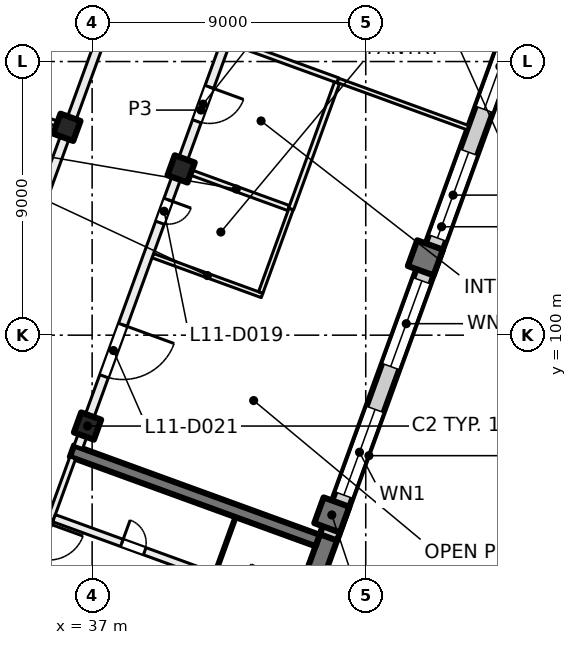
"""IFC4 building model, lengths in metres.
Left out: names, types, materials, properties, quantities, classifications, styles, units other than length and angle.
Written with IfcOpenShell. Run it as: python <this file> out.ifc"""

import sys

from ifc_helpers import new_model, si_unit, direction, frame, frame_2d, origin, origin_2d, place, context, subcontext, project, spatial, rectangle, extrude, element, fill, save


model = new_model("IFC4")
c1 = context("Model", 3, precision=1e-05, world=origin(), true_north=direction((0.0, 1.0)))
c2 = subcontext(c1, "Body", "Model", "MODEL_VIEW")
j1 = project(units=[si_unit("LENGTHUNIT", "METRE"), si_unit("PLANEANGLEUNIT", "RADIAN")], contexts=[c1])
p1 = place(None, origin())
s1 = spatial("IfcSite", under=j1, at=p1, CompositionType="ELEMENT")
p2 = place(p1, origin())
s2 = spatial("IfcBuilding", under=s1, at=p2, CompositionType="ELEMENT")
p3 = place(p2, frame((0.0, 0.0, 51.5)))
s3 = spatial("IfcBuildingStorey", under=s2, at=p3, CompositionType="ELEMENT", Elevation=51.5)
for number, where, z_axis, x_axis in (
    (1, (39.927, 105.468, 0.0), (0.0, 0.0, 1.0), (-0.342, -0.94, 0.0)),
    (2, (36.849, 97.011, 0.0), (0.0, 0.0, 1.0), (-0.342, -0.94, 0.0)),
    (3, (36.169, 106.836, 0.0), (0.0, 0.0, 1.0), (-0.342, -0.94, 0.0)),
):
    element("IfcColumn", number, at=place(p3, frame(where, z_axis=z_axis, x_axis=x_axis)), inside=s3, PredefinedType="COLUMN", context=c2, shape_type="SweptSolid", body=[
        extrude(rectangle(XDim=0.7, YDim=0.7, at=origin_2d()), origin(), (0.0, 0.0, 1.0), 4.0),
    ])
for number, where, z_axis, x_axis in (
    (4, (47.962, 102.544, 0.0), (0.0, 0.0, 1.0), (-0.342, -0.94, 0.0)),
    (5, (44.884, 94.087, 0.0), (0.0, 0.0, 1.0), (-0.342, -0.94, 0.0)),
):
    element("IfcColumn", number, at=place(p3, frame(where, z_axis=z_axis, x_axis=x_axis)), inside=s3, PredefinedType="COLUMN", context=c2, shape_type="SweptSolid", body=[
        extrude(rectangle(XDim=0.9, YDim=0.9, at=origin_2d()), origin(), (0.0, 0.0, 1.0), 4.0),
    ])
p4 = place(p3, frame((41.827, 85.249, 0.0), z_axis=(0.0, 0.0, 1.0), x_axis=(0.342016162452, 0.939694069696, 0.0)))
e6 = element("IfcWall", 6, at=p4, inside=s3, PredefinedType="SHEAR", context=c2, shape_type="SweptSolid", body=[
    extrude(rectangle(XDim=8.9, YDim=0.6, at=frame_2d((4.45, 0.0))), origin(), (0.0, 0.0, 1.0), 4.0),
])
p5 = place(p3, frame((44.418, 93.245, 0.0), z_axis=(0.0, 0.0, 1.0), x_axis=(-0.93969060187, 0.342025690201, 0.0)))
e7 = element("IfcWall", 7, at=p5, inside=s3, PredefinedType="SHEAR", context=c2, shape_type="SweptSolid", body=[
    extrude(rectangle(XDim=8.6, YDim=0.4, at=frame_2d((4.3, 0.0))), origin(), (0.0, 0.0, 1.0), 4.0),
])
p6 = place(p3, frame((52.212, 113.783, 0.0), z_axis=(0.0, 0.0, 1.0), x_axis=(-0.34202521188, -0.939690775968, 0.0)))
e8 = element("IfcWall", 8, at=p6, inside=s3, PredefinedType="SOLIDWALL", context=c2, shape_type="SweptSolid", body=[
    extrude(rectangle(XDim=21.745, YDim=0.6, at=frame_2d((10.873, 0.0))), origin(), (0.0, 0.0, 1.0), 3.625),
])
p7 = place(p6, frame((3.765, 0.0, 0.9)))
e9 = element("IfcOpeningElement", 9, at=p7, cuts=e8, PredefinedType="OPENING", context=c2, shape_type="SweptSolid", body=[
    extrude(rectangle(XDim=3.0, YDim=2.4, at=frame_2d((1.5, 1.2))), frame((0.0, 0.31, 0.0), z_axis=(0.0, -1.0, 0.0), x_axis=(1.0, 0.0, 0.0)), (0.0, 0.0, 1.0), 0.62),
])
p8 = place(p6, frame((8.265, 0.0, 0.9)))
e10 = element("IfcOpeningElement", 10, at=p8, cuts=e8, PredefinedType="OPENING", context=c2, shape_type="SweptSolid", body=[
    extrude(rectangle(XDim=3.0, YDim=2.4, at=frame_2d((1.5, 1.2))), frame((0.0, 0.31, 0.0), z_axis=(0.0, -1.0, 0.0), x_axis=(1.0, 0.0, 0.0)), (0.0, 0.0, 1.0), 0.62),
])
p9 = place(p6, frame((12.765, 0.0, 0.9)))
e11 = element("IfcOpeningElement", 11, at=p9, cuts=e8, PredefinedType="OPENING", context=c2, shape_type="SweptSolid", body=[
    extrude(rectangle(XDim=3.0, YDim=2.4, at=frame_2d((1.5, 1.2))), frame((0.0, 0.31, 0.0), z_axis=(0.0, -1.0, 0.0), x_axis=(1.0, 0.0, 0.0)), (0.0, 0.0, 1.0), 0.62),
])
p10 = place(p6, frame((17.265, 0.0, 0.9)))
e12 = element("IfcOpeningElement", 12, at=p10, cuts=e8, PredefinedType="OPENING", context=c2, shape_type="SweptSolid", body=[
    extrude(rectangle(XDim=3.0, YDim=2.4, at=frame_2d((1.5, 1.2))), frame((0.0, 0.31, 0.0), z_axis=(0.0, -1.0, 0.0), x_axis=(1.0, 0.0, 0.0)), (0.0, 0.0, 1.0), 0.62),
])
p11 = place(p3, frame((24.666, 100.669, 0.0), z_axis=(0.0, 0.0, 1.0), x_axis=(0.34201964167, 0.939692803373, 0.0)))
e13 = element("IfcWall", 13, at=p11, inside=s3, PredefinedType="SOLIDWALL", context=c2, shape_type="SweptSolid", body=[
    extrude(rectangle(XDim=32.884, YDim=0.6, at=frame_2d((16.442, 0.0))), origin(), (0.0, 0.0, 1.0), 3.625),
])
p12 = place(p11, frame((1.48, 0.0, 0.9)))
e14 = element("IfcOpeningElement", 14, at=p12, cuts=e13, PredefinedType="OPENING", context=c2, shape_type="SweptSolid", body=[
    extrude(rectangle(XDim=3.0, YDim=2.4, at=frame_2d((1.5, 1.2))), frame((0.0, 0.31, 0.0), z_axis=(0.0, -1.0, 0.0), x_axis=(1.0, 0.0, 0.0)), (0.0, 0.0, 1.0), 0.62),
])
p13 = place(p11, frame((5.98, 0.0, 0.9)))
e15 = element("IfcOpeningElement", 15, at=p13, cuts=e13, PredefinedType="OPENING", context=c2, shape_type="SweptSolid", body=[
    extrude(rectangle(XDim=3.0, YDim=2.4, at=frame_2d((1.5, 1.2))), frame((0.0, 0.31, 0.0), z_axis=(0.0, -1.0, 0.0), x_axis=(1.0, 0.0, 0.0)), (0.0, 0.0, 1.0), 0.62),
])
p14 = place(p11, frame((10.48, 0.0, 0.9)))
e16 = element("IfcOpeningElement", 16, at=p14, cuts=e13, PredefinedType="OPENING", context=c2, shape_type="SweptSolid", body=[
    extrude(rectangle(XDim=3.0, YDim=2.4, at=frame_2d((1.5, 1.2))), frame((0.0, 0.31, 0.0), z_axis=(0.0, -1.0, 0.0), x_axis=(1.0, 0.0, 0.0)), (0.0, 0.0, 1.0), 0.62),
])
p15 = place(p11, frame((14.98, 0.0, 0.9)))
e17 = element("IfcOpeningElement", 17, at=p15, cuts=e13, PredefinedType="OPENING", context=c2, shape_type="SweptSolid", body=[
    extrude(rectangle(XDim=3.0, YDim=2.4, at=frame_2d((1.5, 1.2))), frame((0.0, 0.31, 0.0), z_axis=(0.0, -1.0, 0.0), x_axis=(1.0, 0.0, 0.0)), (0.0, 0.0, 1.0), 0.62),
])
p16 = place(p11, frame((19.48, 0.0, 0.9)))
e18 = element("IfcOpeningElement", 18, at=p16, cuts=e13, PredefinedType="OPENING", context=c2, shape_type="SweptSolid", body=[
    extrude(rectangle(XDim=3.0, YDim=2.4, at=frame_2d((1.5, 1.2))), frame((0.0, 0.31, 0.0), z_axis=(0.0, -1.0, 0.0), x_axis=(1.0, 0.0, 0.0)), (0.0, 0.0, 1.0), 0.62),
])
p17 = place(p11, frame((23.98, 0.0, 0.9)))
e19 = element("IfcOpeningElement", 19, at=p17, cuts=e13, PredefinedType="OPENING", context=c2, shape_type="SweptSolid", body=[
    extrude(rectangle(XDim=3.0, YDim=2.4, at=frame_2d((1.5, 1.2))), frame((0.0, 0.31, 0.0), z_axis=(0.0, -1.0, 0.0), x_axis=(1.0, 0.0, 0.0)), (0.0, 0.0, 1.0), 0.62),
])
p18 = place(p11, frame((28.48, 0.0, 0.9)))
e20 = element("IfcOpeningElement", 20, at=p18, cuts=e13, PredefinedType="OPENING", context=c2, shape_type="SweptSolid", body=[
    extrude(rectangle(XDim=3.0, YDim=2.4, at=frame_2d((1.5, 1.2))), frame((0.0, 0.31, 0.0), z_axis=(0.0, -1.0, 0.0), x_axis=(1.0, 0.0, 0.0)), (0.0, 0.0, 1.0), 0.62),
])
p19 = place(p3, frame((36.362, 95.964, 0.0), z_axis=(0.0, 0.0, 1.0), x_axis=(-0.341995824804, -0.939701471648, 0.0)))
e21 = element("IfcWall", 21, at=p19, inside=s3, PredefinedType="PARTITIONING", context=c2, shape_type="SweptSolid", body=[
    extrude(rectangle(XDim=3.8, YDim=0.2, at=frame_2d((1.9, 0.0))), origin(), (0.0, 0.0, 1.0), 3.625),
])
p20 = place(p19, frame((2.3, 0.0, 0.0)))
e22 = element("IfcOpeningElement", 22, at=p20, cuts=e21, PredefinedType="OPENING", context=c2, shape_type="SweptSolid", body=[
    extrude(rectangle(XDim=1.2, YDim=2.1, at=frame_2d((0.6, 1.05))), frame((0.0, 0.11, 0.0), z_axis=(0.0, -1.0, 0.0), x_axis=(1.0, 0.0, 0.0)), (0.0, 0.0, 1.0), 0.22),
])
p21 = place(p3, frame((35.19, 92.453, 0.0), z_axis=(0.0, 0.0, 1.0), x_axis=(0.939691552312, -0.342023078919, 0.0)))
e23 = element("IfcWall", 23, at=p21, inside=s3, PredefinedType="PARTITIONING", context=c2, shape_type="SweptSolid", body=[
    extrude(rectangle(XDim=8.4, YDim=0.2, at=frame_2d((4.2, 0.0))), origin(), (0.0, 0.0, 1.0), 3.625),
])
p22 = place(p21, frame((5.25, 0.0, 0.0)))
e24 = element("IfcOpeningElement", 24, at=p22, cuts=e23, PredefinedType="OPENING", context=c2, shape_type="SweptSolid", body=[
    extrude(rectangle(XDim=1.5, YDim=2.1, at=frame_2d((0.75, 1.05))), frame((0.0, 0.11, 0.0), z_axis=(0.0, -1.0, 0.0), x_axis=(1.0, 0.0, 0.0)), (0.0, 0.0, 1.0), 0.22),
])
p23 = place(p3, frame((35.746, 93.98, 0.0), z_axis=(0.0, 0.0, 1.0), x_axis=(0.939691552312, -0.342023078919, 0.0)))
e25 = element("IfcWall", 25, at=p23, inside=s3, PredefinedType="PARTITIONING", context=c2, shape_type="SweptSolid", body=[
    extrude(rectangle(XDim=8.4, YDim=0.25, at=frame_2d((4.2, 0.0))), origin(), (0.0, 0.0, 1.0), 3.625),
])
p24 = place(p23, frame((2.375, 0.0, 0.0)))
e26 = element("IfcOpeningElement", 26, at=p24, cuts=e25, PredefinedType="OPENING", context=c2, shape_type="SweptSolid", body=[
    extrude(rectangle(XDim=0.8, YDim=2.1, at=frame_2d((0.4, 1.05))), frame((0.0, 0.135, 0.0), z_axis=(0.0, -1.0, 0.0), x_axis=(1.0, 0.0, 0.0)), (0.0, 0.0, 1.0), 0.27),
])
p25 = place(p23, frame((6.625, 0.0, 0.0)))
e27 = element("IfcOpeningElement", 27, at=p25, cuts=e25, PredefinedType="OPENING", context=c2, shape_type="SweptSolid", body=[
    extrude(rectangle(XDim=0.8, YDim=2.1, at=frame_2d((0.4, 1.05))), frame((0.0, 0.135, 0.0), z_axis=(0.0, -1.0, 0.0), x_axis=(1.0, 0.0, 0.0)), (0.0, 0.0, 1.0), 0.27),
])
p26 = place(p3, frame((41.718, 94.015, 0.0), z_axis=(0.0, 0.0, 1.0), x_axis=(-0.342064742067, -0.939676386973, 0.0)))
e28 = element("IfcWall", 28, at=p26, inside=s3, PredefinedType="PARTITIONING", context=c2, shape_type="SweptSolid", body=[
    extrude(rectangle(XDim=1.95, YDim=0.1, at=frame_2d((0.975, 0.0))), origin(), (0.0, 0.0, 1.0), 3.625),
])
p27 = place(p3, frame((28.275, 109.709, 0.0), z_axis=(0.0, 0.0, 1.0), x_axis=(0.939697205528, -0.342007546586, 0.0)))
e29 = element("IfcWall", 29, at=p27, inside=s3, PredefinedType="PARTITIONING", context=c2, shape_type="SweptSolid", body=[
    extrude(rectangle(XDim=8.301, YDim=0.175, at=frame_2d((4.15, 0.0))), origin(), (0.0, 0.0, 1.0), 3.625),
])
p28 = place(p3, frame((32.881, 97.657, 0.0), z_axis=(0.0, 0.0, 1.0), x_axis=(0.342017360004, 0.939693633828, 0.0)))
e30 = element("IfcWall", 30, at=p28, inside=s3, PredefinedType="PARTITIONING", context=c2, shape_type="SweptSolid", body=[
    extrude(rectangle(XDim=34.516, YDim=0.3, at=frame_2d((17.258, 0.0))), origin(), (0.0, 0.0, 1.0), 3.625),
])
p29 = place(p28, frame((4.275, 0.0, 0.0)))
e31 = element("IfcOpeningElement", 31, at=p29, cuts=e30, PredefinedType="OPENING", context=c2, shape_type="SweptSolid", body=[
    extrude(rectangle(XDim=1.2, YDim=2.1, at=frame_2d((0.6, 1.05))), frame((0.0, 0.16, 0.0), z_axis=(0.0, -1.0, 0.0), x_axis=(1.0, 0.0, 0.0)), (0.0, 0.0, 1.0), 0.32),
])
p30 = place(p28, frame((16.0, 0.0, 0.0)))
e32 = element("IfcOpeningElement", 32, at=p30, cuts=e30, PredefinedType="OPENING", context=c2, shape_type="SweptSolid", body=[
    extrude(rectangle(XDim=1.0, YDim=2.1, at=frame_2d((0.5, 1.05))), frame((0.0, 0.16, 0.0), z_axis=(0.0, -1.0, 0.0), x_axis=(1.0, 0.0, 0.0)), (0.0, 0.0, 1.0), 0.32),
])
p31 = place(p28, frame((21.5, 0.0, 0.0)))
e33 = element("IfcOpeningElement", 33, at=p31, cuts=e30, PredefinedType="OPENING", context=c2, shape_type="SweptSolid", body=[
    extrude(rectangle(XDim=1.0, YDim=2.1, at=frame_2d((0.5, 1.05))), frame((0.0, 0.16, 0.0), z_axis=(0.0, -1.0, 0.0), x_axis=(1.0, 0.0, 0.0)), (0.0, 0.0, 1.0), 0.32),
])
p32 = place(p3, frame((41.561, 109.663, 0.0), z_axis=(0.0, 0.0, 1.0), x_axis=(0.939610777088, -0.34224492338, 0.0)))
e34 = element("IfcWall", 34, at=p32, inside=s3, PredefinedType="PARTITIONING", context=c2, shape_type="SweptSolid", body=[
    extrude(rectangle(XDim=3.749, YDim=0.175, at=frame_2d((1.875, 0.0))), origin(), (0.0, 0.0, 1.0), 3.625),
])
p33 = place(p3, frame((42.589, 101.306, 0.0), z_axis=(0.0, 0.0, 1.0), x_axis=(-0.939610657605, 0.342245251415, 0.0)))
e35 = element("IfcWall", 35, at=p33, inside=s3, PredefinedType="PARTITIONING", context=c2, shape_type="SweptSolid", body=[
    extrude(rectangle(XDim=3.825, YDim=0.15, at=frame_2d((1.913, 0.0))), origin(), (0.0, 0.0, 1.0), 3.625),
])
p34 = place(p3, frame((43.463, 104.181, 0.0), z_axis=(0.0, 0.0, 1.0), x_axis=(-0.939655178262, 0.342122998299, 0.0)))
e36 = element("IfcWall", 36, at=p34, inside=s3, PredefinedType="PARTITIONING", context=c2, shape_type="SweptSolid", body=[
    extrude(rectangle(XDim=3.663, YDim=0.175, at=frame_2d((1.832, 0.0))), origin(), (0.0, 0.0, 1.0), 3.625),
])
p35 = place(p3, frame((43.545, 104.151, 0.0), z_axis=(0.0, 0.0, 1.0), x_axis=(-0.341877092744, -0.93974467461, 0.0)))
e37 = element("IfcWall", 37, at=p35, inside=s3, PredefinedType="PARTITIONING", context=c2, shape_type="SweptSolid", body=[
    extrude(rectangle(XDim=2.925, YDim=0.15, at=frame_2d((1.462, 0.0))), origin(), (0.0, 0.0, 1.0), 3.625),
])
p36 = place(p3, frame((44.612, 118.483, 0.0), z_axis=(0.0, 0.0, 1.0), x_axis=(-0.342043123066, -0.939684256526, 0.0)))
e38 = element("IfcWall", 38, at=p36, inside=s3, PredefinedType="PARTITIONING", context=c2, shape_type="SweptSolid", body=[
    extrude(rectangle(XDim=23.582, YDim=0.3, at=frame_2d((11.791, 0.0))), origin(), (0.0, 0.0, 1.0), 3.625),
])
p37 = place(p36, frame((14.932, 0.0, 0.0)))
e39 = element("IfcOpeningElement", 39, at=p37, cuts=e38, PredefinedType="OPENING", context=c2, shape_type="SweptSolid", body=[
    extrude(rectangle(XDim=0.8, YDim=2.1, at=frame_2d((0.4, 1.05))), frame((0.0, 0.16, 0.0), z_axis=(0.0, -1.0, 0.0), x_axis=(1.0, 0.0, 0.0)), (0.0, 0.0, 1.0), 0.32),
])
p38 = place(p36, frame((10.982, 0.0, 0.0)))
e40 = element("IfcOpeningElement", 40, at=p38, cuts=e38, PredefinedType="OPENING", context=c2, shape_type="SweptSolid", body=[
    extrude(rectangle(XDim=1.2, YDim=2.1, at=frame_2d((0.6, 1.05))), frame((0.0, 0.16, 0.0), z_axis=(0.0, -1.0, 0.0), x_axis=(1.0, 0.0, 0.0)), (0.0, 0.0, 1.0), 0.32),
])
p39 = place(p36, frame((19.307, 0.0, 0.0)))
e41 = element("IfcOpeningElement", 41, at=p39, cuts=e38, PredefinedType="OPENING", context=c2, shape_type="SweptSolid", body=[
    extrude(rectangle(XDim=1.8, YDim=2.1, at=frame_2d((0.9, 1.05))), frame((0.0, 0.16, 0.0), z_axis=(0.0, -1.0, 0.0), x_axis=(1.0, 0.0, 0.0)), (0.0, 0.0, 1.0), 0.32),
])
p40 = place(p36, frame((5.756, 0.0, 0.0)))
e42 = element("IfcOpeningElement", 42, at=p40, cuts=e38, PredefinedType="OPENING", context=c2, shape_type="SweptSolid", body=[
    extrude(rectangle(XDim=1.8, YDim=2.1, at=frame_2d((0.9, 1.05))), frame((0.0, 0.16, 0.0), z_axis=(0.0, -1.0, 0.0), x_axis=(1.0, 0.0, 0.0)), (0.0, 0.0, 1.0), 0.32),
])
p41 = place(p3, frame((45.054, 108.298, 0.0), z_axis=(0.0, 0.0, 1.0), x_axis=(-0.34193405199, -0.939723951004, 0.0)))
e43 = element("IfcWall", 43, at=p41, inside=s3, PredefinedType="PARTITIONING", context=c2, shape_type="SweptSolid", body=[
    extrude(rectangle(XDim=4.413, YDim=0.175, at=frame_2d((2.207, 0.0))), origin(), (0.0, 0.0, 1.0), 3.625),
])
p42 = place(p3, frame((45.084, 108.38, 0.0), z_axis=(0.0, 0.0, 1.0), x_axis=(0.93972604571, -0.341928295136, 0.0)))
e44 = element("IfcWall", 44, at=p42, inside=s3, PredefinedType="PARTITIONING", context=c2, shape_type="SweptSolid", body=[
    extrude(rectangle(XDim=4.55, YDim=0.15, at=frame_2d((2.275, 0.0))), origin(), (0.0, 0.0, 1.0), 3.625),
])
p43 = place(p7, origin())
e45 = element("IfcWindow", 45, at=p43, inside=s3, PartitioningType="SINGLE_PANEL", PredefinedType="WINDOW", context=c2, shape_type="SweptSolid", body=[
    extrude(rectangle(XDim=3.0, YDim=2.4, at=frame_2d((1.5, 1.2))), frame((0.0, 0.03, 0.0), z_axis=(0.0, -1.0, 0.0), x_axis=(1.0, 0.0, 0.0)), (0.0, 0.0, 1.0), 0.06),
])
fill(e9, e45)
p44 = place(p8, origin())
e46 = element("IfcWindow", 46, at=p44, inside=s3, PartitioningType="SINGLE_PANEL", PredefinedType="WINDOW", context=c2, shape_type="SweptSolid", body=[
    extrude(rectangle(XDim=3.0, YDim=2.4, at=frame_2d((1.5, 1.2))), frame((0.0, 0.03, 0.0), z_axis=(0.0, -1.0, 0.0), x_axis=(1.0, 0.0, 0.0)), (0.0, 0.0, 1.0), 0.06),
])
fill(e10, e46)
p45 = place(p9, origin())
e47 = element("IfcWindow", 47, at=p45, inside=s3, PartitioningType="SINGLE_PANEL", PredefinedType="WINDOW", context=c2, shape_type="SweptSolid", body=[
    extrude(rectangle(XDim=3.0, YDim=2.4, at=frame_2d((1.5, 1.2))), frame((0.0, 0.03, 0.0), z_axis=(0.0, -1.0, 0.0), x_axis=(1.0, 0.0, 0.0)), (0.0, 0.0, 1.0), 0.06),
])
fill(e11, e47)
p46 = place(p10, origin())
e48 = element("IfcWindow", 48, at=p46, inside=s3, PartitioningType="SINGLE_PANEL", PredefinedType="WINDOW", context=c2, shape_type="SweptSolid", body=[
    extrude(rectangle(XDim=3.0, YDim=2.4, at=frame_2d((1.5, 1.2))), frame((0.0, 0.03, 0.0), z_axis=(0.0, -1.0, 0.0), x_axis=(1.0, 0.0, 0.0)), (0.0, 0.0, 1.0), 0.06),
])
fill(e12, e48)
p47 = place(p24, origin())
e49 = element("IfcDoor", 49, at=p47, inside=s3, OperationType="SINGLE_SWING_RIGHT", PredefinedType="DOOR", context=c2, shape_type="SweptSolid", body=[
    extrude(rectangle(XDim=0.8, YDim=2.1, at=frame_2d((0.4, 1.05))), frame((0.0, 0.025, 0.0), z_axis=(0.0, -1.0, 0.0), x_axis=(1.0, 0.0, 0.0)), (0.0, 0.0, 1.0), 0.05),
])
fill(e26, e49)
p48 = place(p37, origin())
e50 = element("IfcDoor", 50, at=p48, inside=s3, OperationType="SINGLE_SWING_LEFT", PredefinedType="DOOR", context=c2, shape_type="SweptSolid", body=[
    extrude(rectangle(XDim=0.8, YDim=2.1, at=frame_2d((0.4, 1.05))), frame((0.0, 0.025, 0.0), z_axis=(0.0, -1.0, 0.0), x_axis=(1.0, 0.0, 0.0)), (0.0, 0.0, 1.0), 0.05),
])
fill(e39, e50)
p49 = place(p38, origin())
e51 = element("IfcDoor", 51, at=p49, inside=s3, OperationType="DOUBLE_DOOR_SINGLE_SWING", PredefinedType="DOOR", context=c2, shape_type="SweptSolid", body=[
    extrude(rectangle(XDim=1.2, YDim=2.1, at=frame_2d((0.6, 1.05))), frame((0.0, 0.025, 0.0), z_axis=(0.0, -1.0, 0.0), x_axis=(1.0, 0.0, 0.0)), (0.0, 0.0, 1.0), 0.05),
])
fill(e40, e51)
p50 = place(p39, origin())
e52 = element("IfcDoor", 52, at=p50, inside=s3, OperationType="DOUBLE_DOOR_SINGLE_SWING", PredefinedType="DOOR", context=c2, shape_type="SweptSolid", body=[
    extrude(rectangle(XDim=1.8, YDim=2.1, at=frame_2d((0.9, 1.05))), frame((0.0, 0.025, 0.0), z_axis=(0.0, -1.0, 0.0), x_axis=(1.0, 0.0, 0.0)), (0.0, 0.0, 1.0), 0.05),
])
fill(e41, e52)
save(model, sys.argv[1])
